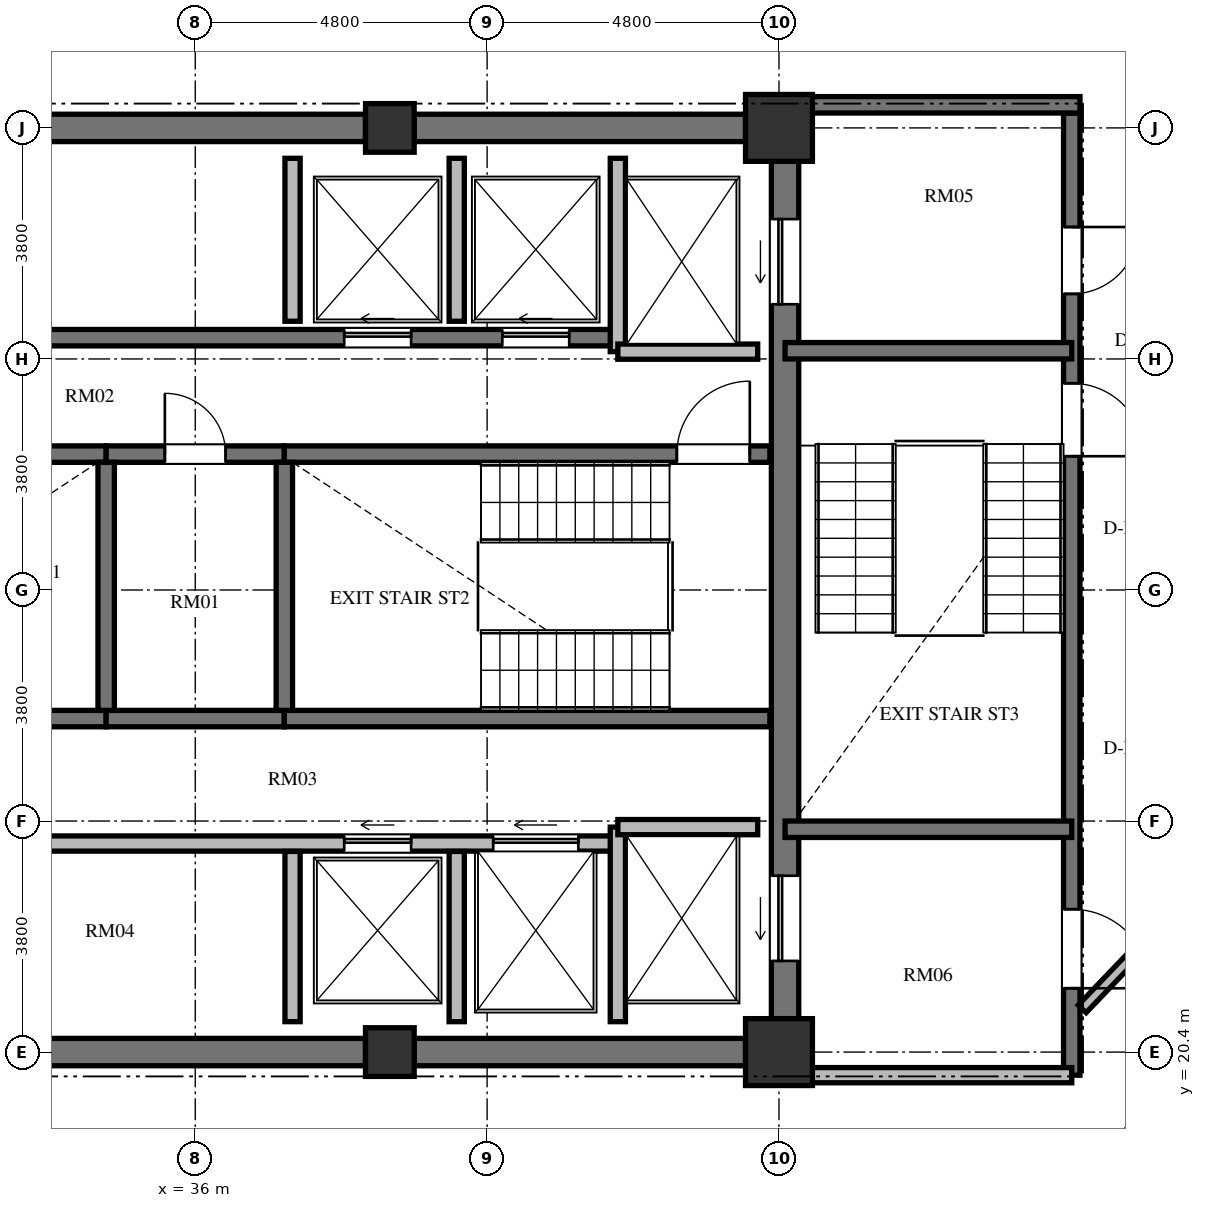
"""IFC4 building model, lengths in metres.
Left out: names, types, materials, properties, quantities, classifications, styles, units other than length and angle.
Written with IfcOpenShell. Run it as: python <this file> out.ifc"""

import sys

from ifc_helpers import new_model, si_unit, direction, frame, frame_2d, origin, origin_2d, place, context, subcontext, project, spatial, rectangle, extrude, element, fill, save


model = new_model("IFC4")
c1 = context("Model", 3, precision=1e-05, world=origin(), true_north=direction((0.0, 1.0)))
c2 = subcontext(c1, "Body", "Model", "MODEL_VIEW")
j1 = project(units=[si_unit("LENGTHUNIT", "METRE"), si_unit("PLANEANGLEUNIT", "RADIAN")], contexts=[c1])
p1 = place(None, origin())
s1 = spatial("IfcSite", under=j1, at=p1, CompositionType="ELEMENT")
p2 = place(p1, origin())
s2 = spatial("IfcBuilding", under=s1, at=p2, CompositionType="ELEMENT")
p3 = place(p2, frame((0.0, 0.0, 265.968)))
s3 = spatial("IfcBuildingStorey", under=s2, at=p3, CompositionType="ELEMENT", Elevation=265.968)
p4 = place(p3, frame((39.2, 20.4, 0.0), z_axis=(0.0, 0.0, 1.0), x_axis=(1.0, 0.0, 0.0)))
e1 = element("IfcColumn", 1, at=p4, inside=s3, PredefinedType="COLUMN", context=c2, shape_type="SweptSolid", body=[
    extrude(rectangle(XDim=0.8, YDim=0.8, at=origin_2d()), origin(), (0.0, 0.0, 1.0), 3.648),
])
for number, where, z_axis, x_axis in (
    (2, (45.6, 20.4, 0.0), (0.0, 0.0, 1.0), (1.0, 0.0, 0.0)),
    (3, (45.6, 35.6, 0.0), (0.0, 0.0, 1.0), (1.0, 0.0, 0.0)),
):
    element("IfcColumn", number, at=place(p3, frame(where, z_axis=z_axis, x_axis=x_axis)), inside=s3, PredefinedType="COLUMN", context=c2, shape_type="SweptSolid", body=[
        extrude(rectangle(XDim=1.1, YDim=1.1, at=origin_2d()), origin(), (0.0, 0.0, 1.0), 3.648),
    ])
p5 = place(p3, frame((39.2, 35.6, 0.0), z_axis=(0.0, 0.0, 1.0), x_axis=(1.0, 0.0, 0.0)))
e4 = element("IfcColumn", 4, at=p5, inside=s3, PredefinedType="COLUMN", context=c2, shape_type="SweptSolid", body=[
    extrude(rectangle(XDim=0.8, YDim=0.8, at=origin_2d()), origin(), (0.0, 0.0, 1.0), 3.648),
])
p6 = place(p3, frame((45.7, 20.95, 0.0), z_axis=(0.0, 0.0, 1.0), x_axis=(0.0, 1.0, 0.0)))
e5 = element("IfcWall", 5, at=p6, inside=s3, PredefinedType="SHEAR", context=c2, shape_type="SweptSolid", body=[
    extrude(rectangle(XDim=14.1, YDim=0.45, at=frame_2d((7.05, 0.0))), origin(), (0.0, 0.0, 1.0), 3.648),
])
p7 = place(p6, frame((11.75, 0.0, 0.0)))
e6 = element("IfcOpeningElement", 6, at=p7, cuts=e5, PredefinedType="OPENING", context=c2, shape_type="SweptSolid", body=[
    extrude(rectangle(XDim=1.4, YDim=2.3, at=frame_2d((0.7, 1.15))), frame((0.0, 0.235, 0.0), z_axis=(0.0, -1.0, 0.0), x_axis=(1.0, 0.0, 0.0)), (0.0, 0.0, 1.0), 0.47),
])
p8 = place(p6, frame((0.95, 0.0, 0.0)))
e7 = element("IfcOpeningElement", 7, at=p8, cuts=e5, PredefinedType="OPENING", context=c2, shape_type="SweptSolid", body=[
    extrude(rectangle(XDim=1.4, YDim=2.3, at=frame_2d((0.7, 1.15))), frame((0.0, 0.235, 0.0), z_axis=(0.0, -1.0, 0.0), x_axis=(1.0, 0.0, 0.0)), (0.0, 0.0, 1.0), 0.47),
])
for number, where, z_axis, x_axis in (
    (8, (33.2, 20.4, 0.0), (0.0, 0.0, 1.0), (1.0, 0.0, 0.0)),
    (9, (33.2, 35.6, 0.0), (0.0, 0.0, 1.0), (1.0, 0.0, 0.0)),
):
    element("IfcWall", number, at=place(p3, frame(where, z_axis=z_axis, x_axis=x_axis)), inside=s3, PredefinedType="SHEAR", context=c2, shape_type="SweptSolid", body=[
        extrude(rectangle(XDim=5.6, YDim=0.45, at=frame_2d((2.8, 0.0))), origin(), (0.0, 0.0, 1.0), 3.648),
    ])
for number, where, z_axis, x_axis in (
    (10, (39.6, 20.4, 0.0), (0.0, 0.0, 1.0), (1.0, 0.0, 0.0)),
    (11, (39.6, 35.6, 0.0), (0.0, 0.0, 1.0), (1.0, 0.0, 0.0)),
):
    element("IfcWall", number, at=place(p3, frame(where, z_axis=z_axis, x_axis=x_axis)), inside=s3, PredefinedType="SHEAR", context=c2, shape_type="SweptSolid", body=[
        extrude(rectangle(XDim=5.45, YDim=0.45, at=frame_2d((2.725, 0.0))), origin(), (0.0, 0.0, 1.0), 3.648),
    ])
p9 = place(p3, frame((26.55, 30.235, 0.0), z_axis=(0.0, 0.0, 1.0), x_axis=(1.0, 0.0, 0.0)))
e12 = element("IfcWall", 12, at=p9, inside=s3, PredefinedType="SHEAR", context=c2, shape_type="SweptSolid", body=[
    extrude(rectangle(XDim=7.985, YDim=0.27, at=frame_2d((3.992, 0.0))), origin(), (0.0, 0.0, 1.0), 3.648),
])
p10 = place(p3, frame((34.535, 30.235, 0.0), z_axis=(0.0, 0.0, 1.0), x_axis=(1.0, 0.0, 0.0)))
e13 = element("IfcWall", 13, at=p10, inside=s3, PredefinedType="SHEAR", context=c2, shape_type="SweptSolid", body=[
    extrude(rectangle(XDim=2.93, YDim=0.27, at=frame_2d((1.465, 0.0))), origin(), (0.0, 0.0, 1.0), 3.648),
])
p11 = place(p10, frame((0.965, 0.0, 0.0)))
e14 = element("IfcOpeningElement", 14, at=p11, cuts=e13, PredefinedType="OPENING", context=c2, shape_type="SweptSolid", body=[
    extrude(rectangle(XDim=1.0, YDim=2.1, at=frame_2d((0.5, 1.05))), frame((0.0, 0.145, 0.0), z_axis=(0.0, -1.0, 0.0), x_axis=(1.0, 0.0, 0.0)), (0.0, 0.0, 1.0), 0.29),
])
p12 = place(p3, frame((37.465, 30.235, 0.0), z_axis=(0.0, 0.0, 1.0), x_axis=(1.0, 0.0, 0.0)))
e15 = element("IfcWall", 15, at=p12, inside=s3, PredefinedType="SHEAR", context=c2, shape_type="SweptSolid", body=[
    extrude(rectangle(XDim=7.985, YDim=0.27, at=frame_2d((3.992, 0.0))), origin(), (0.0, 0.0, 1.0), 3.648),
])
p13 = place(p12, frame((6.455, 0.0, 0.0)))
e16 = element("IfcOpeningElement", 16, at=p13, cuts=e15, PredefinedType="OPENING", context=c2, shape_type="SweptSolid", body=[
    extrude(rectangle(XDim=1.2, YDim=2.15, at=frame_2d((0.6, 1.075))), frame((0.0, 0.145, 0.0), z_axis=(0.0, -1.0, 0.0), x_axis=(1.0, 0.0, 0.0)), (0.0, 0.0, 1.0), 0.29),
])
p14 = place(p3, frame((26.55, 25.885, 0.0), z_axis=(0.0, 0.0, 1.0), x_axis=(1.0, 0.0, 0.0)))
e17 = element("IfcWall", 17, at=p14, inside=s3, PredefinedType="SHEAR", context=c2, shape_type="SweptSolid", body=[
    extrude(rectangle(XDim=7.985, YDim=0.27, at=frame_2d((3.992, 0.0))), origin(), (0.0, 0.0, 1.0), 3.648),
])
p15 = place(p3, frame((34.535, 25.885, 0.0), z_axis=(0.0, 0.0, 1.0), x_axis=(1.0, 0.0, 0.0)))
e18 = element("IfcWall", 18, at=p15, inside=s3, PredefinedType="SHEAR", context=c2, shape_type="SweptSolid", body=[
    extrude(rectangle(XDim=2.93, YDim=0.27, at=frame_2d((1.465, 0.0))), origin(), (0.0, 0.0, 1.0), 3.648),
])
p16 = place(p3, frame((37.465, 25.885, 0.0), z_axis=(0.0, 0.0, 1.0), x_axis=(1.0, 0.0, 0.0)))
e19 = element("IfcWall", 19, at=p16, inside=s3, PredefinedType="SHEAR", context=c2, shape_type="SweptSolid", body=[
    extrude(rectangle(XDim=7.985, YDim=0.27, at=frame_2d((3.992, 0.0))), origin(), (0.0, 0.0, 1.0), 3.648),
])
for number, where, z_axis, x_axis in (
    (20, (34.535, 26.02, 0.0), (0.0, 0.0, 1.0), (0.0, 1.0, 0.0)),
    (21, (37.465, 26.02, 0.0), (0.0, 0.0, 1.0), (0.0, 1.0, 0.0)),
):
    element("IfcWall", number, at=place(p3, frame(where, z_axis=z_axis, x_axis=x_axis)), inside=s3, PredefinedType="SHEAR", context=c2, shape_type="SweptSolid", body=[
        extrude(rectangle(XDim=4.08, YDim=0.27, at=frame_2d((2.04, 0.0))), origin(), (0.0, 0.0, 1.0), 3.648),
    ])
p17 = place(p3, frame((26.55, 32.15, 0.0), z_axis=(0.0, 0.0, 1.0), x_axis=(1.0, 0.0, 0.0)))
e22 = element("IfcWall", 22, at=p17, inside=s3, PredefinedType="SHEAR", context=c2, shape_type="SweptSolid", body=[
    extrude(rectangle(XDim=16.4, YDim=0.27, at=frame_2d((8.2, 0.0))), origin(), (0.0, 0.0, 1.0), 3.648),
])
p18 = place(p17, frame((5.125, 0.0, 0.0)))
e23 = element("IfcOpeningElement", 23, at=p18, cuts=e22, PredefinedType="OPENING", context=c2, shape_type="SweptSolid", body=[
    extrude(rectangle(XDim=1.05, YDim=2.15, at=frame_2d((0.525, 1.075))), frame((0.0, 0.145, 0.0), z_axis=(0.0, -1.0, 0.0), x_axis=(1.0, 0.0, 0.0)), (0.0, 0.0, 1.0), 0.29),
])
p19 = place(p17, frame((11.9, 0.0, 0.0)))
e24 = element("IfcOpeningElement", 24, at=p19, cuts=e22, PredefinedType="OPENING", context=c2, shape_type="SweptSolid", body=[
    extrude(rectangle(XDim=1.1, YDim=2.2, at=frame_2d((0.55, 1.1))), frame((0.0, 0.145, 0.0), z_axis=(0.0, -1.0, 0.0), x_axis=(1.0, 0.0, 0.0)), (0.0, 0.0, 1.0), 0.29),
])
p20 = place(p17, frame((14.5, 0.0, 0.0)))
e25 = element("IfcOpeningElement", 25, at=p20, cuts=e22, PredefinedType="OPENING", context=c2, shape_type="SweptSolid", body=[
    extrude(rectangle(XDim=1.1, YDim=2.2, at=frame_2d((0.55, 1.1))), frame((0.0, 0.145, 0.0), z_axis=(0.0, -1.0, 0.0), x_axis=(1.0, 0.0, 0.0)), (0.0, 0.0, 1.0), 0.29),
])
p21 = place(p3, frame((26.75, 23.83, 0.0), z_axis=(0.0, 0.0, 1.0), x_axis=(1.0, 0.0, 0.0)))
e26 = element("IfcWall", 26, at=p21, inside=s3, PredefinedType="SOLIDWALL", context=c2, shape_type="SweptSolid", body=[
    extrude(rectangle(XDim=16.2, YDim=0.25, at=frame_2d((8.1, 0.0))), origin(), (0.0, 0.0, 1.0), 3.198),
])
p22 = place(p21, frame((4.75, 0.0, 0.0)))
e27 = element("IfcOpeningElement", 27, at=p22, cuts=e26, PredefinedType="OPENING", context=c2, shape_type="SweptSolid", body=[
    extrude(rectangle(XDim=1.4, YDim=2.2, at=frame_2d((0.7, 1.1))), frame((0.0, 0.135, 0.0), z_axis=(0.0, -1.0, 0.0), x_axis=(1.0, 0.0, 0.0)), (0.0, 0.0, 1.0), 0.27),
])
p23 = place(p21, frame((11.7, 0.0, 0.0)))
e28 = element("IfcOpeningElement", 28, at=p23, cuts=e26, PredefinedType="OPENING", context=c2, shape_type="SweptSolid", body=[
    extrude(rectangle(XDim=1.1, YDim=2.2, at=frame_2d((0.55, 1.1))), frame((0.0, 0.135, 0.0), z_axis=(0.0, -1.0, 0.0), x_axis=(1.0, 0.0, 0.0)), (0.0, 0.0, 1.0), 0.27),
])
p24 = place(p21, frame((14.15, 0.0, 0.0)))
e29 = element("IfcOpeningElement", 29, at=p24, cuts=e26, PredefinedType="OPENING", context=c2, shape_type="SweptSolid", body=[
    extrude(rectangle(XDim=1.4, YDim=2.3, at=frame_2d((0.7, 1.15))), frame((0.0, 0.135, 0.0), z_axis=(0.0, -1.0, 0.0), x_axis=(1.0, 0.0, 0.0)), (0.0, 0.0, 1.0), 0.27),
])
p25 = place(p3, frame((42.95, 31.92, 0.0), z_axis=(0.0, 0.0, 1.0), x_axis=(0.0, 1.0, 0.0)))
e30 = element("IfcWall", 30, at=p25, inside=s3, PredefinedType="SOLIDWALL", context=c2, shape_type="SweptSolid", body=[
    extrude(rectangle(XDim=3.18, YDim=0.25, at=frame_2d((1.59, 0.0))), origin(), (0.0, 0.0, 1.0), 3.198),
])
p26 = place(p3, frame((42.95, 31.92, 0.0), z_axis=(0.0, 0.0, 1.0), x_axis=(1.0, 0.0, 0.0)))
e31 = element("IfcWall", 31, at=p26, inside=s3, PredefinedType="SOLIDWALL", context=c2, shape_type="SweptSolid", body=[
    extrude(rectangle(XDim=2.3, YDim=0.25, at=frame_2d((1.15, 0.0))), origin(), (0.0, 0.0, 1.0), 3.198),
])
p27 = place(p3, frame((42.95, 20.9, 0.0), z_axis=(0.0, 0.0, 1.0), x_axis=(0.0, 1.0, 0.0)))
e32 = element("IfcWall", 32, at=p27, inside=s3, PredefinedType="SOLIDWALL", context=c2, shape_type="SweptSolid", body=[
    extrude(rectangle(XDim=3.2, YDim=0.25, at=frame_2d((1.6, 0.0))), origin(), (0.0, 0.0, 1.0), 3.198),
])
p28 = place(p3, frame((42.95, 24.1, 0.0), z_axis=(0.0, 0.0, 1.0), x_axis=(1.0, 0.0, 0.0)))
e33 = element("IfcWall", 33, at=p28, inside=s3, PredefinedType="SOLIDWALL", context=c2, shape_type="SweptSolid", body=[
    extrude(rectangle(XDim=2.3, YDim=0.25, at=frame_2d((1.15, 0.0))), origin(), (0.0, 0.0, 1.0), 3.198),
])
p29 = place(p3, frame((37.6, 32.42, 0.0), z_axis=(0.0, 0.0, 1.0), x_axis=(0.0, 1.0, 0.0)))
e34 = element("IfcWall", 34, at=p29, inside=s3, PredefinedType="SOLIDWALL", context=c2, shape_type="SweptSolid", body=[
    extrude(rectangle(XDim=2.68, YDim=0.25, at=frame_2d((1.34, 0.0))), origin(), (0.0, 0.0, 1.0), 3.198),
])
p30 = place(p3, frame((37.6, 20.9, 0.0), z_axis=(0.0, 0.0, 1.0), x_axis=(0.0, 1.0, 0.0)))
e35 = element("IfcWall", 35, at=p30, inside=s3, PredefinedType="SOLIDWALL", context=c2, shape_type="SweptSolid", body=[
    extrude(rectangle(XDim=2.8, YDim=0.25, at=frame_2d((1.4, 0.0))), origin(), (0.0, 0.0, 1.0), 3.198),
])
p31 = place(p3, frame((40.3, 32.42, 0.0), z_axis=(0.0, 0.0, 1.0), x_axis=(0.0, 1.0, 0.0)))
e36 = element("IfcWall", 36, at=p31, inside=s3, PredefinedType="SOLIDWALL", context=c2, shape_type="SweptSolid", body=[
    extrude(rectangle(XDim=2.68, YDim=0.25, at=frame_2d((1.34, 0.0))), origin(), (0.0, 0.0, 1.0), 3.198),
])
p32 = place(p3, frame((40.3, 20.9, 0.0), z_axis=(0.0, 0.0, 1.0), x_axis=(0.0, 1.0, 0.0)))
e37 = element("IfcWall", 37, at=p32, inside=s3, PredefinedType="SOLIDWALL", context=c2, shape_type="SweptSolid", body=[
    extrude(rectangle(XDim=2.8, YDim=0.25, at=frame_2d((1.4, 0.0))), origin(), (0.0, 0.0, 1.0), 3.198),
])
p33 = place(p3, frame((50.415, 35.845, 0.0), z_axis=(0.0, 0.0, 1.0), x_axis=(0.0, -1.0, 0.0)))
e38 = element("IfcWall", 38, at=p33, inside=s3, PredefinedType="SHEAR", context=c2, shape_type="SweptSolid", body=[
    extrude(rectangle(XDim=15.825, YDim=0.27, at=frame_2d((7.913, 0.0))), origin(), (0.0, 0.0, 1.0), 3.648),
])
p34 = place(p33, frame((4.445, 0.0, 0.0)))
e39 = element("IfcOpeningElement", 39, at=p34, cuts=e38, PredefinedType="OPENING", context=c2, shape_type="SweptSolid", body=[
    extrude(rectangle(XDim=1.2, YDim=2.15, at=frame_2d((0.6, 1.075))), frame((0.0, 0.145, 0.0), z_axis=(0.0, -1.0, 0.0), x_axis=(1.0, 0.0, 0.0)), (0.0, 0.0, 1.0), 0.29),
])
p35 = place(p33, frame((1.875, 0.0, 0.0)))
e40 = element("IfcOpeningElement", 40, at=p35, cuts=e38, PredefinedType="OPENING", context=c2, shape_type="SweptSolid", body=[
    extrude(rectangle(XDim=1.1, YDim=2.12, at=frame_2d((0.55, 1.06))), frame((0.0, 0.145, 0.0), z_axis=(0.0, -1.0, 0.0), x_axis=(1.0, 0.0, 0.0)), (0.0, 0.0, 1.0), 0.29),
])
p36 = place(p33, frame((13.095, 0.0, 0.0)))
e41 = element("IfcOpeningElement", 41, at=p36, cuts=e38, PredefinedType="OPENING", context=c2, shape_type="SweptSolid", body=[
    extrude(rectangle(XDim=1.3, YDim=2.2, at=frame_2d((0.65, 1.1))), frame((0.0, 0.145, 0.0), z_axis=(0.0, -1.0, 0.0), x_axis=(1.0, 0.0, 0.0)), (0.0, 0.0, 1.0), 0.29),
])
p37 = place(p3, frame((45.925, 35.98, 0.0), z_axis=(0.0, 0.0, 1.0), x_axis=(1.0, 0.0, 0.0)))
e42 = element("IfcWall", 42, at=p37, inside=s3, PredefinedType="SHEAR", context=c2, shape_type="SweptSolid", body=[
    extrude(rectangle(XDim=4.625, YDim=0.27, at=frame_2d((2.312, 0.0))), origin(), (0.0, 0.0, 1.0), 3.648),
])
for number, where, z_axis, x_axis in (
    (43, (45.7, 31.935, 0.0), (0.0, 0.0, 1.0), (1.0, 0.0, 0.0)),
    (44, (45.7, 24.065, 0.0), (0.0, 0.0, 1.0), (1.0, 0.0, 0.0)),
):
    element("IfcWall", number, at=place(p3, frame(where, z_axis=z_axis, x_axis=x_axis)), inside=s3, PredefinedType="SHEAR", context=c2, shape_type="SweptSolid", body=[
        extrude(rectangle(XDim=4.715, YDim=0.27, at=frame_2d((2.357, 0.0))), origin(), (0.0, 0.0, 1.0), 3.648),
    ])
p38 = place(p3, frame((45.7, 20.02, 0.0), z_axis=(0.0, 0.0, 1.0), x_axis=(1.0, 0.0, 0.0)))
e45 = element("IfcWall", 45, at=p38, inside=s3, PredefinedType="SOLIDWALL", context=c2, shape_type="SweptSolid", body=[
    extrude(rectangle(XDim=4.715, YDim=0.25, at=frame_2d((2.357, 0.0))), origin(), (0.0, 0.0, 1.0), 3.198),
])
p39 = place(p3, frame((53.078, 23.714, 0.0), z_axis=(0.0, 0.0, 1.0), x_axis=(-0.691353379446, -0.722516785085, 0.0)))
e46 = element("IfcWall", 46, at=p39, inside=s3, PredefinedType="PARTITIONING", context=c2, shape_type="SweptSolid", body=[
    extrude(rectangle(XDim=3.604, YDim=0.18, at=frame_2d((1.802, 0.0))), origin(), (0.0, 0.0, 1.0), 3.198),
])
p40 = place(p13, origin())
e47 = element("IfcDoor", 47, at=p40, inside=s3, OperationType="SINGLE_SWING_RIGHT", PredefinedType="DOOR", context=c2, shape_type="SweptSolid", body=[
    extrude(rectangle(XDim=1.2, YDim=2.15, at=frame_2d((0.6, 1.075))), frame((0.0, 0.025, 0.0), z_axis=(0.0, -1.0, 0.0), x_axis=(1.0, 0.0, 0.0)), (0.0, 0.0, 1.0), 0.05),
])
fill(e16, e47)
p41 = place(p11, origin())
e48 = element("IfcDoor", 48, at=p41, inside=s3, OperationType="SINGLE_SWING_LEFT", PredefinedType="DOOR", context=c2, shape_type="SweptSolid", body=[
    extrude(rectangle(XDim=1.0, YDim=2.1, at=frame_2d((0.5, 1.05))), frame((0.0, 0.025, 0.0), z_axis=(0.0, -1.0, 0.0), x_axis=(1.0, 0.0, 0.0)), (0.0, 0.0, 1.0), 0.05),
])
fill(e14, e48)
p42 = place(p19, origin())
e49 = element("IfcDoor", 49, at=p42, inside=s3, OperationType="SLIDING_TO_LEFT", PredefinedType="DOOR", context=c2, shape_type="SweptSolid", body=[
    extrude(rectangle(XDim=1.1, YDim=2.2, at=frame_2d((0.55, 1.1))), frame((0.0, 0.025, 0.0), z_axis=(0.0, -1.0, 0.0), x_axis=(1.0, 0.0, 0.0)), (0.0, 0.0, 1.0), 0.05),
])
fill(e24, e49)
p43 = place(p20, origin())
e50 = element("IfcDoor", 50, at=p43, inside=s3, OperationType="SLIDING_TO_LEFT", PredefinedType="DOOR", context=c2, shape_type="SweptSolid", body=[
    extrude(rectangle(XDim=1.1, YDim=2.2, at=frame_2d((0.55, 1.1))), frame((0.0, 0.025, 0.0), z_axis=(0.0, -1.0, 0.0), x_axis=(1.0, 0.0, 0.0)), (0.0, 0.0, 1.0), 0.05),
])
fill(e25, e50)
p44 = place(p23, origin())
e51 = element("IfcDoor", 51, at=p44, inside=s3, OperationType="SLIDING_TO_LEFT", PredefinedType="DOOR", context=c2, shape_type="SweptSolid", body=[
    extrude(rectangle(XDim=1.1, YDim=2.2, at=frame_2d((0.55, 1.1))), frame((0.0, 0.025, 0.0), z_axis=(0.0, -1.0, 0.0), x_axis=(1.0, 0.0, 0.0)), (0.0, 0.0, 1.0), 0.05),
])
fill(e28, e51)
p45 = place(p7, origin())
e52 = element("IfcDoor", 52, at=p45, inside=s3, OperationType="SLIDING_TO_LEFT", PredefinedType="DOOR", context=c2, shape_type="SweptSolid", body=[
    extrude(rectangle(XDim=1.4, YDim=2.3, at=frame_2d((0.7, 1.15))), frame((0.0, 0.025, 0.0), z_axis=(0.0, -1.0, 0.0), x_axis=(1.0, 0.0, 0.0)), (0.0, 0.0, 1.0), 0.05),
])
fill(e6, e52)
p46 = place(p8, origin())
e53 = element("IfcDoor", 53, at=p46, inside=s3, OperationType="SLIDING_TO_LEFT", PredefinedType="DOOR", context=c2, shape_type="SweptSolid", body=[
    extrude(rectangle(XDim=1.4, YDim=2.3, at=frame_2d((0.7, 1.15))), frame((0.0, 0.025, 0.0), z_axis=(0.0, -1.0, 0.0), x_axis=(1.0, 0.0, 0.0)), (0.0, 0.0, 1.0), 0.05),
])
fill(e7, e53)
p47 = place(p24, origin())
e54 = element("IfcDoor", 54, at=p47, inside=s3, OperationType="SLIDING_TO_LEFT", PredefinedType="DOOR", context=c2, shape_type="SweptSolid", body=[
    extrude(rectangle(XDim=1.4, YDim=2.3, at=frame_2d((0.7, 1.15))), frame((0.0, 0.025, 0.0), z_axis=(0.0, -1.0, 0.0), x_axis=(1.0, 0.0, 0.0)), (0.0, 0.0, 1.0), 0.05),
])
fill(e29, e54)
p48 = place(p34, origin())
e55 = element("IfcDoor", 55, at=p48, inside=s3, OperationType="SINGLE_SWING_RIGHT", PredefinedType="DOOR", context=c2, shape_type="SweptSolid", body=[
    extrude(rectangle(XDim=1.2, YDim=2.15, at=frame_2d((0.6, 1.075))), frame((0.0, 0.025, 0.0), z_axis=(0.0, -1.0, 0.0), x_axis=(1.0, 0.0, 0.0)), (0.0, 0.0, 1.0), 0.05),
])
fill(e39, e55)
p49 = place(p35, origin())
e56 = element("IfcDoor", 56, at=p49, inside=s3, OperationType="SINGLE_SWING_LEFT", PredefinedType="DOOR", context=c2, shape_type="SweptSolid", body=[
    extrude(rectangle(XDim=1.1, YDim=2.12, at=frame_2d((0.55, 1.06))), frame((0.0, 0.025, 0.0), z_axis=(0.0, -1.0, 0.0), x_axis=(1.0, 0.0, 0.0)), (0.0, 0.0, 1.0), 0.05),
])
fill(e40, e56)
p50 = place(p36, origin())
e57 = element("IfcDoor", 57, at=p50, inside=s3, OperationType="SINGLE_SWING_RIGHT", PredefinedType="DOOR", context=c2, shape_type="SweptSolid", body=[
    extrude(rectangle(XDim=1.3, YDim=2.2, at=frame_2d((0.65, 1.1))), frame((0.0, 0.025, 0.0), z_axis=(0.0, -1.0, 0.0), x_axis=(1.0, 0.0, 0.0)), (0.0, 0.0, 1.0), 0.05),
])
fill(e41, e57)
save(model, sys.argv[1])
